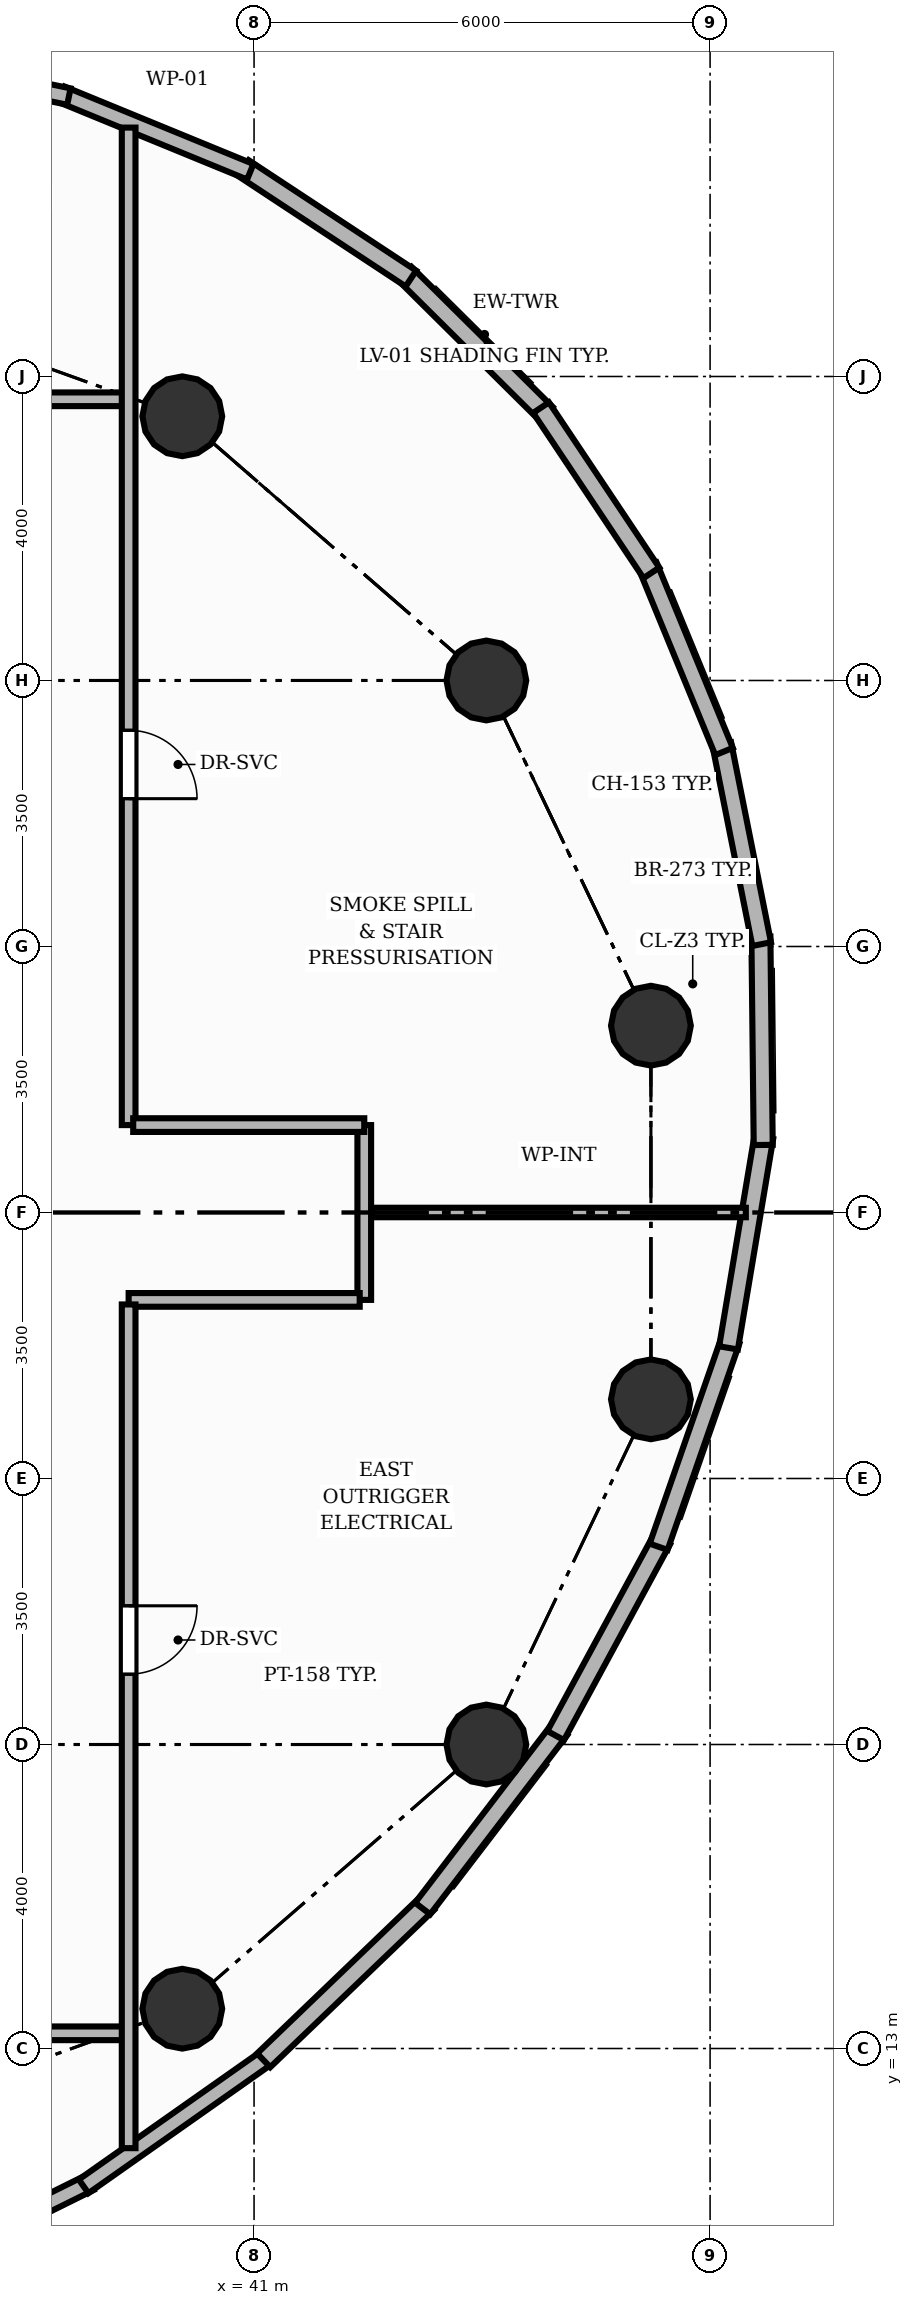
"""IFC4 building model, lengths in metres.
Left out: names, types, materials, properties, quantities, classifications, styles, units other than length and angle.
Written with IfcOpenShell. Run it as: python <this file> out.ifc"""

import sys

from ifc_helpers import new_model, si_unit, direction, frame, frame_2d, origin, origin_2d, place, context, subcontext, project, spatial, rectangle, circle, extrude, element, fill, save


model = new_model("IFC4")
c1 = context("Model", 3, precision=1e-05, world=origin(), true_north=direction((0.0, 1.0)))
c2 = subcontext(c1, "Body", "Model", "MODEL_VIEW")
j1 = project(units=[si_unit("LENGTHUNIT", "METRE"), si_unit("PLANEANGLEUNIT", "RADIAN")], contexts=[c1])
p1 = place(None, origin())
s1 = spatial("IfcSite", under=j1, at=p1, CompositionType="ELEMENT")
p2 = place(p1, origin())
s2 = spatial("IfcBuilding", under=s1, at=p2, CompositionType="ELEMENT")
p3 = place(p2, frame((0.0, 0.0, 158.56)))
s3 = spatial("IfcBuildingStorey", under=s2, at=p3, CompositionType="ELEMENT", Elevation=158.56)
for number, where, z_axis, x_axis in (
    (1, (46.221, 26.458, 0.0), (0.0, 0.0, 1.0), (1.0, 0.0, 0.0)),
    (2, (44.056, 31.0, 0.0), (0.0, 0.0, 1.0), (1.0, 0.0, 0.0)),
    (3, (40.056, 34.477, 0.0), (0.0, 0.0, 1.0), (1.0, 0.0, 0.0)),
    (4, (40.056, 13.523, 0.0), (0.0, 0.0, 1.0), (1.0, 0.0, 0.0)),
    (5, (44.056, 17.0, 0.0), (0.0, 0.0, 1.0), (1.0, 0.0, 0.0)),
    (6, (46.221, 21.542, 0.0), (0.0, 0.0, 1.0), (1.0, 0.0, 0.0)),
):
    element("IfcColumn", number, at=place(p3, frame(where, z_axis=z_axis, x_axis=x_axis)), inside=s3, PredefinedType="COLUMN", context=c2, shape_type="SweptSolid", body=[
        extrude(circle(Radius=0.525, at=origin_2d()), origin(), (0.0, 0.0, 1.0), 4.48),
    ])
p4 = place(p3, frame((42.985, 36.353, 0.0), z_axis=(0.0, 0.0, 1.0), x_axis=(0.709903110451, -0.704299349547, 0.0)))
e7 = element("IfcWall", 7, at=p4, inside=s3, PredefinedType="SOLIDWALL", context=c2, shape_type="SweptSolid", body=[
    extrude(rectangle(XDim=2.614, YDim=0.25, at=frame_2d((1.307, 0.0))), origin(), (0.0, 0.0, 1.0), 4.24),
])
p5 = place(p3, frame((40.861, 37.741, 0.0), z_axis=(0.0, 0.0, 1.0), x_axis=(0.834886685629, -0.55042185836, 0.0)))
e8 = element("IfcWall", 8, at=p5, inside=s3, PredefinedType="SOLIDWALL", context=c2, shape_type="SweptSolid", body=[
    extrude(rectangle(XDim=2.638, YDim=0.25, at=frame_2d((1.319, 0.0))), origin(), (0.0, 0.0, 1.0), 4.24),
])
p6 = place(p3, frame((38.468, 38.712, 0.0), z_axis=(0.0, 0.0, 1.0), x_axis=(0.925126004984, -0.379660209797, 0.0)))
e9 = element("IfcWall", 9, at=p6, inside=s3, PredefinedType="PARAPET", context=c2, shape_type="SweptSolid", body=[
    extrude(rectangle(XDim=2.683, YDim=0.22, at=frame_2d((1.341, 0.0))), origin(), (0.0, 0.0, 1.0), 1.15),
])
p7 = place(p3, frame((35.879, 39.238, 0.0), z_axis=(0.0, 0.0, 1.0), x_axis=(0.979324939828, -0.202293505163, 0.0)))
e10 = element("IfcWall", 10, at=p7, inside=s3, PredefinedType="PARAPET", context=c2, shape_type="SweptSolid", body=[
    extrude(rectangle(XDim=2.742, YDim=0.22, at=frame_2d((1.371, 0.0))), origin(), (0.0, 0.0, 1.0), 1.15),
])
p8 = place(p3, frame((38.84, 11.236, 0.0), z_axis=(0.0, 0.0, 1.0), x_axis=(-0.895985112276, -0.444084089536, 0.0)))
e11 = element("IfcWall", 11, at=p8, inside=s3, PredefinedType="PARAPET", context=c2, shape_type="SweptSolid", body=[
    extrude(rectangle(XDim=2.967, YDim=0.22, at=frame_2d((1.483, 0.0))), origin(), (0.0, 0.0, 1.0), 1.15),
])
p9 = place(p3, frame((41.201, 12.906, 0.0), z_axis=(0.0, 0.0, 1.0), x_axis=(-0.817874769697, -0.575396264407, 0.0)))
e12 = element("IfcWall", 12, at=p9, inside=s3, PredefinedType="PARAPET", context=c2, shape_type="SweptSolid", body=[
    extrude(rectangle(XDim=2.988, YDim=0.22, at=frame_2d((1.494, 0.0))), origin(), (0.0, 0.0, 1.0), 1.15),
])
p10 = place(p3, frame((43.283, 14.914, 0.0), z_axis=(0.0, 0.0, 1.0), x_axis=(-0.721419973425, -0.692497813675, 0.0)))
e13 = element("IfcWall", 13, at=p10, inside=s3, PredefinedType="SOLIDWALL", context=c2, shape_type="SweptSolid", body=[
    extrude(rectangle(XDim=2.988, YDim=0.25, at=frame_2d((1.494, 0.0))), origin(), (0.0, 0.0, 1.0), 4.24),
])
p11 = place(p3, frame((45.021, 17.199, 0.0), z_axis=(0.0, 0.0, 1.0), x_axis=(-0.607477593954, -0.794336813224, 0.0)))
e14 = element("IfcWall", 14, at=p11, inside=s3, PredefinedType="SOLIDWALL", context=c2, shape_type="SweptSolid", body=[
    extrude(rectangle(XDim=2.967, YDim=0.25, at=frame_2d((1.484, 0.0))), origin(), (0.0, 0.0, 1.0), 4.24),
])
p12 = place(p3, frame((46.362, 19.691, 0.0), z_axis=(0.0, 0.0, 1.0), x_axis=(-0.476366446531, -0.879246841689, 0.0)))
e15 = element("IfcWall", 15, at=p12, inside=s3, PredefinedType="SOLIDWALL", context=c2, shape_type="SweptSolid", body=[
    extrude(rectangle(XDim=2.927, YDim=0.25, at=frame_2d((1.463, 0.0))), origin(), (0.0, 0.0, 1.0), 4.24),
])
p13 = place(p3, frame((47.267, 22.314, 0.0), z_axis=(0.0, 0.0, 1.0), x_axis=(-0.328698694134, -0.944434840777, 0.0)))
e16 = element("IfcWall", 16, at=p13, inside=s3, PredefinedType="SOLIDWALL", context=c2, shape_type="SweptSolid", body=[
    extrude(rectangle(XDim=2.872, YDim=0.25, at=frame_2d((1.436, 0.0))), origin(), (0.0, 0.0, 1.0), 4.24),
])
p14 = place(p3, frame((47.707, 24.988, 0.0), z_axis=(0.0, 0.0, 1.0), x_axis=(-0.165301369928, -0.986243102435, 0.0)))
e17 = element("IfcWall", 17, at=p14, inside=s3, PredefinedType="SOLIDWALL", context=c2, shape_type="SweptSolid", body=[
    extrude(rectangle(XDim=2.808, YDim=0.25, at=frame_2d((1.404, 0.0))), origin(), (0.0, 0.0, 1.0), 4.24),
])
p15 = place(p3, frame((47.668, 27.631, 0.0), z_axis=(0.0, 0.0, 1.0), x_axis=(0.011130209899, -0.999938057295, 0.0)))
e18 = element("IfcWall", 18, at=p15, inside=s3, PredefinedType="SOLIDWALL", context=c2, shape_type="SweptSolid", body=[
    extrude(rectangle(XDim=2.742, YDim=0.25, at=frame_2d((1.371, 0.0))), origin(), (0.0, 0.0, 1.0), 4.24),
])
p16 = place(p3, frame((47.154, 30.162, 0.0), z_axis=(0.0, 0.0, 1.0), x_axis=(0.195468590426, -0.980709962301, 0.0)))
e19 = element("IfcWall", 19, at=p16, inside=s3, PredefinedType="SOLIDWALL", context=c2, shape_type="SweptSolid", body=[
    extrude(rectangle(XDim=2.683, YDim=0.25, at=frame_2d((1.341, 0.0))), origin(), (0.0, 0.0, 1.0), 4.24),
])
p17 = place(p3, frame((46.18, 32.506, 0.0), z_axis=(0.0, 0.0, 1.0), x_axis=(0.380340181735, -0.924846660889, 0.0)))
e20 = element("IfcWall", 20, at=p17, inside=s3, PredefinedType="SOLIDWALL", context=c2, shape_type="SweptSolid", body=[
    extrude(rectangle(XDim=2.638, YDim=0.25, at=frame_2d((1.319, 0.0))), origin(), (0.0, 0.0, 1.0), 4.24),
])
p18 = place(p3, frame((44.776, 34.59, 0.0), z_axis=(0.0, 0.0, 1.0), x_axis=(0.555346632741, -0.831618973751, 0.0)))
e21 = element("IfcWall", 21, at=p18, inside=s3, PredefinedType="SOLIDWALL", context=c2, shape_type="SweptSolid", body=[
    extrude(rectangle(XDim=2.614, YDim=0.25, at=frame_2d((1.307, 0.0))), origin(), (0.0, 0.0, 1.0), 4.24),
])
p19 = place(p3, frame((39.35, 13.2, 0.0), z_axis=(0.0, 0.0, 1.0), x_axis=(-1.0, 0.0, 0.0)))
e22 = element("IfcWall", 22, at=p19, inside=s3, PredefinedType="PARTITIONING", context=c2, shape_type="SweptSolid", body=[
    extrude(rectangle(XDim=18.2, YDim=0.18, at=frame_2d((9.1, 0.0))), origin(), (0.0, 0.0, 1.0), 3.768),
])
p20 = place(p19, frame((8.65, 0.0, 0.0)))
e23 = element("IfcOpeningElement", 23, at=p20, cuts=e22, PredefinedType="OPENING", context=c2, shape_type="SweptSolid", body=[
    extrude(rectangle(XDim=0.9, YDim=2.1, at=frame_2d((0.45, 1.05))), frame((0.0, 0.1, 0.0), z_axis=(0.0, -1.0, 0.0), x_axis=(1.0, 0.0, 0.0)), (0.0, 0.0, 1.0), 0.2),
])
p21 = place(p3, frame((22.5, 34.7, 0.0), z_axis=(0.0, 0.0, 1.0), x_axis=(1.0, 0.0, 0.0)))
e24 = element("IfcWall", 24, at=p21, inside=s3, PredefinedType="PARTITIONING", context=c2, shape_type="SweptSolid", body=[
    extrude(rectangle(XDim=16.851, YDim=0.18, at=frame_2d((8.425, 0.0))), origin(), (0.0, 0.0, 1.0), 3.768),
])
p22 = place(p21, frame((12.755, 0.0, 0.0)))
e25 = element("IfcOpeningElement", 25, at=p22, cuts=e24, PredefinedType="OPENING", context=c2, shape_type="SweptSolid", body=[
    extrude(rectangle(XDim=0.9, YDim=2.1, at=frame_2d((0.45, 1.05))), frame((0.0, 0.1, 0.0), z_axis=(0.0, -1.0, 0.0), x_axis=(1.0, 0.0, 0.0)), (0.0, 0.0, 1.0), 0.2),
])
p23 = place(p21, frame((7.19, 0.0, 0.0)))
e26 = element("IfcOpeningElement", 26, at=p23, cuts=e24, PredefinedType="OPENING", context=c2, shape_type="SweptSolid", body=[
    extrude(rectangle(XDim=0.9, YDim=2.1, at=frame_2d((0.45, 1.05))), frame((0.0, 0.1, 0.0), z_axis=(0.0, -1.0, 0.0), x_axis=(1.0, 0.0, 0.0)), (0.0, 0.0, 1.0), 0.2),
])
p24 = place(p21, frame((4.02, 0.0, 0.0)))
e27 = element("IfcOpeningElement", 27, at=p24, cuts=e24, PredefinedType="OPENING", context=c2, shape_type="SweptSolid", body=[
    extrude(rectangle(XDim=0.9, YDim=2.1, at=frame_2d((0.45, 1.05))), frame((0.0, 0.1, 0.0), z_axis=(0.0, -1.0, 0.0), x_axis=(1.0, 0.0, 0.0)), (0.0, 0.0, 1.0), 0.2),
])
p25 = place(p3, frame((42.45, 25.15, 0.0), z_axis=(0.0, 0.0, 1.0), x_axis=(0.0, -1.0, 0.0)))
e28 = element("IfcWall", 28, at=p25, inside=s3, PredefinedType="PARTITIONING", context=c2, shape_type="SweptSolid", body=[
    extrude(rectangle(XDim=2.3, YDim=0.18, at=frame_2d((1.15, 0.0))), origin(), (0.0, 0.0, 1.0), 4.235),
])
p26 = place(p3, frame((42.39, 22.85, 0.0), z_axis=(0.0, 0.0, 1.0), x_axis=(-1.0, 0.0, 0.0)))
e29 = element("IfcWall", 29, at=p26, inside=s3, PredefinedType="PARTITIONING", context=c2, shape_type="SweptSolid", body=[
    extrude(rectangle(XDim=3.04, YDim=0.18, at=frame_2d((1.52, 0.0))), origin(), (0.0, 0.0, 1.0), 2.668),
])
p27 = place(p3, frame((39.35, 22.79, 0.0), z_axis=(0.0, 0.0, 1.0), x_axis=(0.0, -1.0, 0.0)))
e30 = element("IfcWall", 30, at=p27, inside=s3, PredefinedType="PARTITIONING", context=c2, shape_type="SweptSolid", body=[
    extrude(rectangle(XDim=11.101, YDim=0.18, at=frame_2d((5.551, 0.0))), origin(), (0.0, 0.0, 1.0), 4.235),
])
p28 = place(p27, frame((3.965, 0.0, 0.0)))
e31 = element("IfcOpeningElement", 31, at=p28, cuts=e30, PredefinedType="OPENING", context=c2, shape_type="SweptSolid", body=[
    extrude(rectangle(XDim=0.9, YDim=2.1, at=frame_2d((0.45, 1.05))), frame((0.0, 0.1, 0.0), z_axis=(0.0, -1.0, 0.0), x_axis=(1.0, 0.0, 0.0)), (0.0, 0.0, 1.0), 0.2),
])
p29 = place(p3, frame((39.35, 38.275, 0.0), z_axis=(0.0, 0.0, 1.0), x_axis=(0.0, -1.0, 0.0)))
e32 = element("IfcWall", 32, at=p29, inside=s3, PredefinedType="PARTITIONING", context=c2, shape_type="SweptSolid", body=[
    extrude(rectangle(XDim=13.125, YDim=0.18, at=frame_2d((6.562, 0.0))), origin(), (0.0, 0.0, 1.0), 4.235),
])
p30 = place(p29, frame((7.93, 0.0, 0.0)))
e33 = element("IfcOpeningElement", 33, at=p30, cuts=e32, PredefinedType="OPENING", context=c2, shape_type="SweptSolid", body=[
    extrude(rectangle(XDim=0.9, YDim=2.1, at=frame_2d((0.45, 1.05))), frame((0.0, 0.1, 0.0), z_axis=(0.0, -1.0, 0.0), x_axis=(1.0, 0.0, 0.0)), (0.0, 0.0, 1.0), 0.2),
])
p31 = place(p3, frame((39.41, 25.15, 0.0), z_axis=(0.0, 0.0, 1.0), x_axis=(1.0, 0.0, 0.0)))
e34 = element("IfcWall", 34, at=p31, inside=s3, PredefinedType="PARTITIONING", context=c2, shape_type="SweptSolid", body=[
    extrude(rectangle(XDim=3.04, YDim=0.18, at=frame_2d((1.52, 0.0))), origin(), (0.0, 0.0, 1.0), 2.668),
])
p32 = place(p3, frame((42.55, 24.0, 0.0), z_axis=(0.0, 0.0, 1.0), x_axis=(1.0, 0.0, 0.0)))
e35 = element("IfcWall", 35, at=p32, inside=s3, PredefinedType="PARTITIONING", context=c2, shape_type="SweptSolid", body=[
    extrude(rectangle(XDim=4.92, YDim=0.125, at=frame_2d((2.46, 0.0))), origin(), (0.0, 0.0, 1.0), 4.235),
])
p33 = place(p28, origin())
e36 = element("IfcDoor", 36, at=p33, inside=s3, OperationType="SINGLE_SWING_LEFT", PredefinedType="DOOR", context=c2, shape_type="SweptSolid", body=[
    extrude(rectangle(XDim=0.9, YDim=2.1, at=frame_2d((0.45, 1.05))), frame((0.0, 0.025, 0.0), z_axis=(0.0, -1.0, 0.0), x_axis=(1.0, 0.0, 0.0)), (0.0, 0.0, 1.0), 0.05),
])
fill(e31, e36)
p34 = place(p30, origin())
e37 = element("IfcDoor", 37, at=p34, inside=s3, OperationType="SINGLE_SWING_RIGHT", PredefinedType="DOOR", context=c2, shape_type="SweptSolid", body=[
    extrude(rectangle(XDim=0.9, YDim=2.1, at=frame_2d((0.45, 1.05))), frame((0.0, 0.025, 0.0), z_axis=(0.0, -1.0, 0.0), x_axis=(1.0, 0.0, 0.0)), (0.0, 0.0, 1.0), 0.05),
])
fill(e33, e37)
save(model, sys.argv[1])
